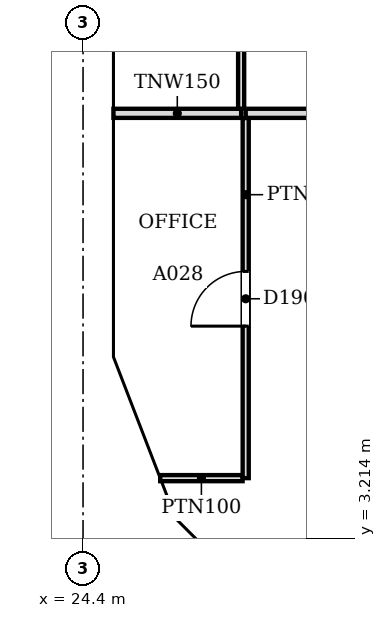
"""IFC4 building model, lengths in metres.
Left out: names, types, materials, properties, quantities, classifications, styles, units other than length and angle.
Written with IfcOpenShell. Run it as: python <this file> out.ifc"""

import sys

from ifc_helpers import new_model, si_unit, direction, frame, frame_2d, origin, place, context, subcontext, project, spatial, polyline, rectangle, outline, extrude, faceted_brep, source, transform, mapped, element, fill, save


model = new_model("IFC4")
c1 = context("Model", 3, precision=1e-05, world=origin(), true_north=direction((0.0, 1.0)))
c2 = subcontext(c1, "Body", "Model", "MODEL_VIEW")
j1 = project(units=[si_unit("LENGTHUNIT", "METRE"), si_unit("PLANEANGLEUNIT", "RADIAN")], contexts=[c1])
p1 = place(None, origin())
s1 = spatial("IfcSite", under=j1, at=p1, CompositionType="ELEMENT")
p2 = place(p1, origin())
s2 = spatial("IfcBuilding", under=s1, at=p2, CompositionType="ELEMENT")
p3 = place(p2, frame((0.0, 0.0, 135.4)))
s3 = spatial("IfcBuildingStorey", under=s2, at=p3, CompositionType="ELEMENT", Elevation=135.4)
m1 = source(origin(), c2, "Body", "Brep", [
    faceted_brep([(3.096, -0.25, 0.0), (6.1, -0.25, 3.8), (3.096, -0.25, 7.6), (0.047, -0.25, 3.857), (0.047, -0.25, 3.743), (0.0, 0.25, 3.8), (3.096, 0.25, 7.6), (6.053, 0.25, 3.859), (6.053, 0.25, 3.741), (3.096, 0.25, 0.0), (6.1, -0.0, 3.8), (0.0, 0.0, 3.8)], [[[0, 1, 2, 3, 4]], [[5, 6, 7, 8, 9]], [[9, 8, 10, 1, 0]], [[7, 6, 2, 1, 10]], [[6, 5, 11, 3, 2]], [[5, 9, 0, 4, 11]], [[11, 4, 3]], [[10, 8, 7]]]),
])
p4 = place(p3, frame((24.65, 12.247, -3.8), z_axis=(0.0, 0.0, 1.0), x_axis=(0.0, -1.0, 0.0)))
e1 = element("IfcWall", 1, at=p4, inside=s3, PredefinedType="SOLIDWALL", context=c2, shape_type="MappedRepresentation", body=[
    mapped(m1, transform((0.0, 0.0, 0.0), scale=1.0)),
])
m2 = source(origin(), c2, "Body", "SweptSolid", [
    extrude(outline(polyline([(3.094, 0.399), (5.781, 3.8), (3.094, 7.2), (0.323, 3.8), (3.094, 0.399)])), frame((0.0, 0.26, 0.0), z_axis=(0.0, -1.0, 0.0), x_axis=(1.0, 0.0, 0.0)), (0.0, 0.0, 1.0), 0.52),
])
p5 = place(p4, origin())
e2 = element("IfcOpeningElement", 2, at=p5, cuts=e1, PredefinedType="OPENING", context=c2, shape_type="MappedRepresentation", body=[
    mapped(m2, transform((0.0, 0.0, 0.0), scale=1.0)),
])
m3 = source(origin(), c2, "Body", "Brep", [
    faceted_brep([(2.95, -0.25, 0.0), (3.003, -0.25, 0.068), (3.003, -0.25, 7.531), (2.95, -0.25, 7.6), (0.0, -0.25, 3.8), (0.047, 0.25, 3.86), (2.898, 0.25, 7.532), (2.898, 0.25, 0.068), (0.047, 0.25, 3.74), (2.95, 0.0, 0.0), (2.95, 0.0, 7.6), (0.0, 0.0, 3.8)], [[[0, 1, 2, 3, 4]], [[5, 6, 7, 8]], [[1, 0, 9]], [[10, 3, 2]], [[6, 5, 11, 4, 3, 10]], [[8, 7, 9, 0, 4, 11]], [[8, 11, 5]], [[1, 9, 7, 6, 10, 2]]]),
])
p6 = place(p3, frame((24.65, 6.146, -3.8), z_axis=(0.0, 0.0, 1.0), x_axis=(0.359953949349, -0.932970071518, 0.0)))
e3 = element("IfcWall", 3, at=p6, inside=s3, PredefinedType="SOLIDWALL", context=c2, shape_type="MappedRepresentation", body=[
    mapped(m3, transform((0.0, 0.0, 0.0), scale=1.0)),
])
m4 = source(origin(), c2, "Body", "SweptSolid", [
    extrude(outline(polyline([(2.75, 6.935), (0.316, 3.8), (2.75, 0.665), (2.75, 6.935)])), frame((0.0, 0.26, 0.0), z_axis=(0.0, -1.0, 0.0), x_axis=(1.0, 0.0, 0.0)), (0.0, 0.0, 1.0), 0.52),
])
p7 = place(p6, origin())
e4 = element("IfcOpeningElement", 4, at=p7, cuts=e3, PredefinedType="OPENING", context=c2, shape_type="MappedRepresentation", body=[
    mapped(m4, transform((0.0, 0.0, 0.0), scale=1.0)),
])
m5 = source(origin(), c2, "Body", "Brep", [
    faceted_brep([(0.053, -0.25, 0.0), (2.997, -0.25, 3.8), (0.053, -0.25, 7.6), (0.0, -0.25, 7.532), (0.0, -0.25, 0.068), (0.106, 0.25, 7.531), (2.944, 0.25, 3.868), (2.944, 0.25, 3.732), (0.106, 0.25, 0.068), (2.997, 0.0, 3.8), (0.053, 0.0, 0.0), (0.053, 0.0, 7.6)], [[[0, 1, 2, 3, 4]], [[5, 6, 7, 8]], [[8, 7, 9, 1, 0, 10]], [[6, 5, 11, 2, 1, 9]], [[3, 2, 11]], [[10, 0, 4]], [[8, 10, 4, 3, 11, 5]], [[9, 7, 6]]]),
])
p8 = place(p3, frame((25.675, 3.431, -3.8), z_axis=(0.0, 0.0, 1.0), x_axis=(0.707106781187, -0.707106781187, 0.0)))
e5 = element("IfcWall", 5, at=p8, inside=s3, PredefinedType="SOLIDWALL", context=c2, shape_type="MappedRepresentation", body=[
    mapped(m5, transform((0.0, 0.0, 0.0), scale=1.0)),
])
m6 = source(origin(), c2, "Body", "SweptSolid", [
    extrude(outline(polyline([(0.253, 0.666), (2.681, 3.8), (0.253, 6.934), (0.253, 0.666)])), frame((0.0, 0.26, 0.0), z_axis=(0.0, -1.0, 0.0), x_axis=(1.0, 0.0, 0.0)), (0.0, 0.0, 1.0), 0.52),
])
p9 = place(p8, origin())
e6 = element("IfcOpeningElement", 6, at=p9, cuts=e5, PredefinedType="OPENING", context=c2, shape_type="MappedRepresentation", body=[
    mapped(m6, transform((0.0, 0.0, 0.0), scale=1.0)),
])
p10 = place(p2, frame((0.0, 0.0, 139.2)))
s4 = spatial("IfcBuildingStorey", under=s2, at=p10, CompositionType="ELEMENT", Elevation=139.2)
m7 = source(origin(), c2, "Body", "Brep", [
    faceted_brep([(0.093, -0.25, 0.057), (3.143, -0.25, 3.8), (0.093, -0.25, 7.543), (0.0, 0.25, 7.544), (0.047, 0.25, 7.6), (3.143, 0.25, 3.8), (0.047, 0.25, 0.0), (0.0, 0.25, 0.056), (0.047, 0.0, 0.0), (0.047, 0.0, 7.6)], [[[0, 1, 2]], [[3, 4, 5, 6, 7]], [[6, 5, 1, 0, 8]], [[5, 4, 9, 2, 1]], [[4, 3, 9]], [[7, 6, 8]], [[7, 8, 0, 2, 9, 3]]]),
])
p11 = place(p10, frame((24.65, 12.293, -3.8), z_axis=(0.0, 0.0, 1.0), x_axis=(0.0, -1.0, 0.0)))
e7 = element("IfcWall", 7, at=p11, inside=s4, PredefinedType="SOLIDWALL", context=c2, shape_type="MappedRepresentation", body=[
    mapped(m7, transform((0.0, 0.0, 0.0), scale=1.0)),
])
m8 = source(origin(), c2, "Body", "SweptSolid", [
    extrude(outline(polyline([(0.247, 0.641), (2.821, 3.8), (0.247, 6.959), (0.247, 0.641)])), frame((0.0, 0.26, 0.0), z_axis=(0.0, -1.0, 0.0), x_axis=(1.0, 0.0, 0.0)), (0.0, 0.0, 1.0), 0.52),
])
p12 = place(p11, origin())
e8 = element("IfcOpeningElement", 8, at=p12, cuts=e7, PredefinedType="OPENING", context=c2, shape_type="MappedRepresentation", body=[
    mapped(m8, transform((0.0, 0.0, 0.0), scale=1.0)),
])
m9 = source(origin(), c2, "Body", "Brep", [
    faceted_brep([(3.003, -0.25, 0.0), (3.05, -0.25, 0.06), (3.05, -0.25, 7.54), (3.003, -0.25, 7.6), (0.0, -0.25, 3.8), (0.0, 0.25, 3.8), (2.957, 0.25, 7.541), (2.957, 0.25, 0.059), (3.003, 0.0, 0.0), (3.003, 0.0, 7.6)], [[[0, 1, 2, 3, 4]], [[5, 6, 7]], [[1, 0, 8]], [[9, 3, 2]], [[6, 5, 4, 3, 9]], [[5, 7, 8, 0, 4]], [[1, 8, 7, 6, 9, 2]]]),
])
p13 = place(p10, frame((24.65, 9.15, -3.8), z_axis=(0.0, 0.0, 1.0), x_axis=(0.0, -1.0, 0.0)))
e9 = element("IfcWall", 9, at=p13, inside=s4, PredefinedType="SOLIDWALL", context=c2, shape_type="MappedRepresentation", body=[
    mapped(m9, transform((0.0, 0.0, 0.0), scale=1.0)),
])
m10 = source(origin(), c2, "Body", "SweptSolid", [
    extrude(outline(polyline([(2.803, 6.944), (0.319, 3.8), (2.803, 0.656), (2.803, 6.944)])), frame((0.0, 0.26, 0.0), z_axis=(0.0, -1.0, 0.0), x_axis=(1.0, 0.0, 0.0)), (0.0, 0.0, 1.0), 0.52),
])
p14 = place(p13, origin())
e10 = element("IfcOpeningElement", 10, at=p14, cuts=e9, PredefinedType="OPENING", context=c2, shape_type="MappedRepresentation", body=[
    mapped(m10, transform((0.0, 0.0, 0.0), scale=1.0)),
])
m11 = source(origin(), c2, "Body", "Brep", [
    faceted_brep([(0.047, -0.25, 0.0), (2.997, -0.25, 3.8), (0.047, -0.25, 7.6), (0.0, -0.25, 7.541), (0.0, -0.25, 0.059), (0.093, 0.25, 7.54), (2.944, 0.25, 3.868), (2.944, 0.25, 3.732), (0.093, 0.25, 0.06), (2.997, 0.0, 3.8), (0.047, 0.0, 0.0), (0.047, 0.0, 7.6)], [[[0, 1, 2, 3, 4]], [[5, 6, 7, 8]], [[8, 7, 9, 1, 0, 10]], [[6, 5, 11, 2, 1, 9]], [[3, 2, 11]], [[10, 0, 4]], [[8, 10, 4, 3, 11, 5]], [[9, 7, 6]]]),
])
p15 = place(p10, frame((24.633, 6.19, -3.8), z_axis=(0.0, 0.0, 1.0), x_axis=(0.359901446078, -0.932990326376, 0.0)))
e11 = element("IfcWall", 11, at=p15, inside=s4, PredefinedType="SOLIDWALL", context=c2, shape_type="MappedRepresentation", body=[
    mapped(m11, transform((0.0, 0.0, 0.0), scale=1.0)),
])
m12 = source(origin(), c2, "Body", "SweptSolid", [
    extrude(outline(polyline([(0.247, 0.665), (2.681, 3.8), (0.247, 6.935), (0.247, 0.665)])), frame((0.0, 0.26, 0.0), z_axis=(0.0, -1.0, 0.0), x_axis=(1.0, 0.0, 0.0)), (0.0, 0.0, 1.0), 0.52),
])
p16 = place(p15, origin())
e12 = element("IfcOpeningElement", 12, at=p16, cuts=e11, PredefinedType="OPENING", context=c2, shape_type="MappedRepresentation", body=[
    mapped(m12, transform((0.0, 0.0, 0.0), scale=1.0)),
])
m13 = source(origin(), c2, "Body", "Brep", [
    faceted_brep([(2.944, -0.25, 0.0), (2.997, -0.25, 0.068), (2.997, -0.25, 7.532), (2.944, -0.25, 7.6), (0.0, -0.25, 3.8), (0.053, 0.25, 3.868), (2.891, 0.25, 7.532), (2.891, 0.25, 0.068), (0.053, 0.25, 3.732), (2.944, 0.0, 0.0), (2.944, 0.0, 7.6), (0.0, 0.0, 3.8)], [[[0, 1, 2, 3, 4]], [[5, 6, 7, 8]], [[1, 0, 9]], [[10, 3, 2]], [[6, 5, 11, 4, 3, 10]], [[8, 7, 9, 0, 4, 11]], [[8, 11, 5]], [[1, 9, 7, 6, 10, 2]]]),
])
p17 = place(p10, frame((25.712, 3.394, -3.8), z_axis=(0.0, 0.0, 1.0), x_axis=(0.707066050402, -0.707147509625, 0.0)))
e13 = element("IfcWall", 13, at=p17, inside=s4, PredefinedType="SOLIDWALL", context=c2, shape_type="MappedRepresentation", body=[
    mapped(m13, transform((0.0, 0.0, 0.0), scale=1.0)),
])
m14 = source(origin(), c2, "Body", "SweptSolid", [
    extrude(outline(polyline([(2.744, 6.934), (0.316, 3.8), (2.744, 0.667), (2.744, 6.934)])), frame((0.0, 0.26, 0.0), z_axis=(0.0, -1.0, 0.0), x_axis=(1.0, 0.0, 0.0)), (0.0, 0.0, 1.0), 0.52),
])
p18 = place(p17, origin())
e14 = element("IfcOpeningElement", 14, at=p18, cuts=e13, PredefinedType="OPENING", context=c2, shape_type="MappedRepresentation", body=[
    mapped(m14, transform((0.0, 0.0, 0.0), scale=1.0)),
])
p19 = place(p3, frame((25.669, 4.2, 0.0), z_axis=(0.0, 0.0, 1.0), x_axis=(1.0, 0.0, 0.0)))
e15 = element("IfcWall", 15, at=p19, inside=s3, PredefinedType="PARTITIONING", context=c2, shape_type="SweptSolid", body=[
    extrude(rectangle(XDim=1.355, YDim=0.1, at=frame_2d((0.678, 0.0))), origin(), (0.0, 0.0, 1.0), 3.067),
])
p20 = place(p3, frame((27.075, 4.2, 0.0), z_axis=(0.0, 0.0, 1.0), x_axis=(0.0, 1.0, 0.0)))
e16 = element("IfcWall", 16, at=p20, inside=s3, PredefinedType="PARTITIONING", context=c2, shape_type="SweptSolid", body=[
    extrude(rectangle(XDim=5.924, YDim=0.1, at=frame_2d((2.962, 0.0))), origin(), (0.0, 0.0, 1.0), 3.067),
])
m15 = source(origin(), c2, "Body", "SweptSolid", [
    extrude(rectangle(XDim=0.9, YDim=2.1, at=frame_2d((0.45, 1.05))), frame((0.0, 0.06, 0.0), z_axis=(0.0, -1.0, 0.0), x_axis=(1.0, 0.0, 0.0)), (0.0, 0.0, 1.0), 0.12),
])
p21 = place(p20, frame((2.5, 0.0, 0.0)))
e17 = element("IfcOpeningElement", 17, at=p21, cuts=e16, PredefinedType="OPENING", context=c2, shape_type="MappedRepresentation", body=[
    mapped(m15, transform((0.0, 0.0, 0.0), scale=1.0)),
])
p22 = place(p3, frame((24.9, 10.2, 0.0), z_axis=(0.0, 0.0, 1.0), x_axis=(1.0, 0.0, 0.0)))
e18 = element("IfcWall", 18, at=p22, inside=s3, PredefinedType="PARTITIONING", context=c2, shape_type="SweptSolid", body=[
    extrude(rectangle(XDim=2.1, YDim=0.15, at=frame_2d((1.05, 0.0))), origin(), (0.0, 0.0, 1.0), 3.067),
])
p23 = place(p3, frame((27.075, 10.2, 0.0), z_axis=(0.0, 0.0, 1.0), x_axis=(1.0, 0.0, 0.0)))
e19 = element("IfcWall", 19, at=p23, inside=s3, PredefinedType="PARTITIONING", context=c2, shape_type="SweptSolid", body=[
    extrude(rectangle(XDim=17.849, YDim=0.15, at=frame_2d((8.925, 0.0))), origin(), (0.0, 0.0, 1.0), 3.067),
])
p24 = place(p3, frame((27.0, 10.276, 0.0), z_axis=(0.0, 0.0, 1.0), x_axis=(0.0, 1.0, 0.0)))
e20 = element("IfcWall", 20, at=p24, inside=s3, PredefinedType="PARTITIONING", context=c2, shape_type="SweptSolid", body=[
    extrude(rectangle(XDim=8.448, YDim=0.1, at=frame_2d((4.224, 0.0))), origin(), (0.0, 0.0, 1.0), 3.067),
])
p25 = place(p24, frame((1.6, 0.0, 0.0)))
e21 = element("IfcOpeningElement", 21, at=p25, cuts=e20, PredefinedType="OPENING", context=c2, shape_type="MappedRepresentation", body=[
    mapped(m15, transform((0.0, 0.0, 0.0), scale=1.0)),
])
p26 = place(p24, frame((5.779, 0.0, 0.0)))
e22 = element("IfcOpeningElement", 22, at=p26, cuts=e20, PredefinedType="OPENING", context=c2, shape_type="MappedRepresentation", body=[
    mapped(m15, transform((0.0, 0.0, 0.0), scale=1.0)),
])
m16 = source(origin(), c2, "Body", "SweptSolid", [
    extrude(rectangle(XDim=0.9, YDim=2.1, at=frame_2d((0.45, 1.05))), frame((0.0, 0.025, 0.0), z_axis=(0.0, -1.0, 0.0), x_axis=(1.0, 0.0, 0.0)), (0.0, 0.0, 1.0), 0.05),
])
p27 = place(p21, origin())
e23 = element("IfcDoor", 23, at=p27, inside=s3, OperationType="SINGLE_SWING_LEFT", PredefinedType="DOOR", context=c2, shape_type="MappedRepresentation", body=[
    mapped(m16, transform((0.0, 0.0, 0.0), scale=1.0)),
])
fill(e17, e23)
save(model, sys.argv[1])
